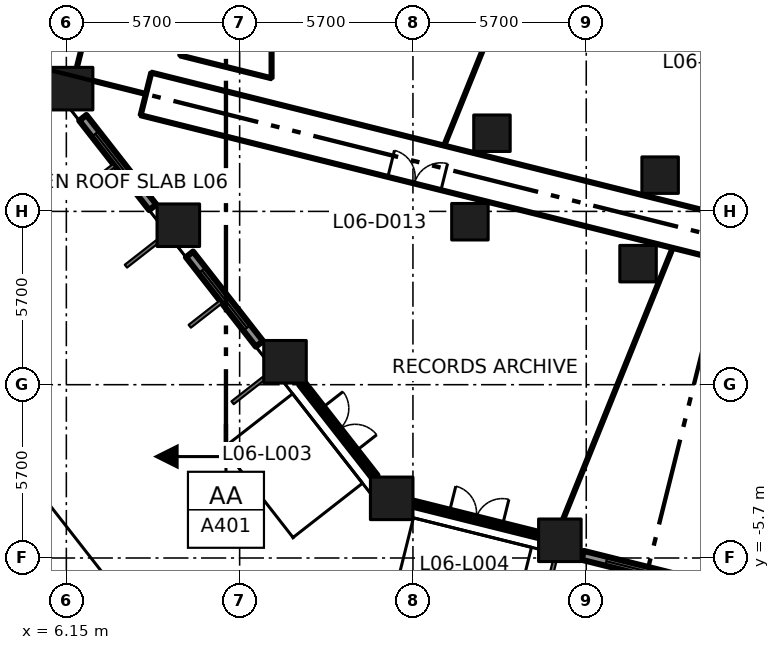
"""IFC4 building model, lengths in metres.
Left out: names, types, materials, properties, quantities, classifications, styles, units other than length and angle.
Written with IfcOpenShell. Run it as: python <this file> out.ifc"""

import sys

from ifc_helpers import new_model, si_unit, direction, frame, frame_2d, origin, origin_2d, place, context, subcontext, project, spatial, rectangle, extrude, element, fill, save


model = new_model("IFC4")
c1 = context("Model", 3, precision=1e-05, world=origin(), true_north=direction((0.0, 1.0)))
c2 = subcontext(c1, "Body", "Model", "MODEL_VIEW")
j1 = project(units=[si_unit("LENGTHUNIT", "METRE"), si_unit("PLANEANGLEUNIT", "RADIAN")], contexts=[c1])
p1 = place(None, origin())
s1 = spatial("IfcSite", under=j1, at=p1, CompositionType="ELEMENT")
p2 = place(p1, origin())
s2 = spatial("IfcBuilding", under=s1, at=p2, CompositionType="ELEMENT")
p3 = place(p2, frame((0.0, 0.0, 33.0)))
s3 = spatial("IfcBuildingStorey", under=s2, at=p3, CompositionType="ELEMENT", Elevation=33.0)
for number, where, z_axis, x_axis in (
    (1, (16.851, -3.738, 0.0), (0.0, 0.0, 1.0), (1.0, 0.0, 0.0)),
    (2, (13.342, 0.754, 0.0), (0.0, 0.0, 1.0), (1.0, 0.0, 0.0)),
    (3, (9.833, 5.245, 0.0), (0.0, 0.0, 1.0), (1.0, 0.0, 0.0)),
    (4, (6.323, 9.737, 0.0), (0.0, 0.0, 1.0), (1.0, 0.0, 0.0)),
    (5, (22.382, -5.117, 0.0), (0.0, 0.0, 1.0), (1.0, 0.0, 0.0)),
):
    element("IfcColumn", number, at=place(p3, frame(where, z_axis=z_axis, x_axis=x_axis)), inside=s3, PredefinedType="COLUMN", context=c2, shape_type="SweptSolid", body=[
        extrude(rectangle(XDim=1.4, YDim=1.4, at=origin_2d()), origin(), (0.0, 0.0, 1.0), 4.2),
    ])
for number, where, z_axis, x_axis in (
    (6, (19.424, 5.36, 0.0), (0.0, 0.0, 1.0), (1.0, 0.0, 0.0)),
    (7, (24.954, 3.981, 0.0), (0.0, 0.0, 1.0), (1.0, 0.0, 0.0)),
    (8, (20.149, 8.271, 0.0), (0.0, 0.0, 1.0), (1.0, 0.0, 0.0)),
    (9, (25.68, 6.892, 0.0), (0.0, 0.0, 1.0), (1.0, 0.0, 0.0)),
):
    element("IfcColumn", number, at=place(p3, frame(where, z_axis=z_axis, x_axis=x_axis)), inside=s3, PredefinedType="COLUMN", context=c2, shape_type="SweptSolid", body=[
        extrude(rectangle(XDim=1.2, YDim=1.2, at=origin_2d()), origin(), (0.0, 0.0, 1.0), 4.2),
    ])
p4 = place(p3, frame((6.692, 8.778, 0.0), z_axis=(0.0, 0.0, 1.0), x_axis=(0.615767067156, -0.787928244833, 0.0)))
e10 = element("IfcWall", 10, at=p4, inside=s3, PredefinedType="SOLIDWALL", context=c2, shape_type="SweptSolid", body=[
    extrude(rectangle(XDim=3.735, YDim=0.3, at=frame_2d((1.868, 0.0))), origin(), (0.0, 0.0, 1.0), 3.1),
])
p5 = place(p4, frame((0.668, 0.0, 0.8)))
e11 = element("IfcOpeningElement", 11, at=p5, cuts=e10, PredefinedType="OPENING", context=c2, shape_type="SweptSolid", body=[
    extrude(rectangle(XDim=2.4, YDim=2.1, at=frame_2d((1.2, 1.05))), frame((0.0, 0.16, 0.0), z_axis=(0.0, -1.0, 0.0), x_axis=(1.0, 0.0, 0.0)), (0.0, 0.0, 1.0), 0.32),
])
p6 = place(p3, frame((10.202, 4.286, 0.0), z_axis=(0.0, 0.0, 1.0), x_axis=(0.615636430057, -0.788030320474, 0.0)))
e12 = element("IfcWall", 12, at=p6, inside=s3, PredefinedType="SOLIDWALL", context=c2, shape_type="SweptSolid", body=[
    extrude(rectangle(XDim=3.734, YDim=0.3, at=frame_2d((1.867, 0.0))), origin(), (0.0, 0.0, 1.0), 3.1),
])
p7 = place(p6, frame((0.667, 0.0, 0.8)))
e13 = element("IfcOpeningElement", 13, at=p7, cuts=e12, PredefinedType="OPENING", context=c2, shape_type="SweptSolid", body=[
    extrude(rectangle(XDim=2.4, YDim=2.1, at=frame_2d((1.2, 1.05))), frame((0.0, 0.16, 0.0), z_axis=(0.0, -1.0, 0.0), x_axis=(1.0, 0.0, 0.0)), (0.0, 0.0, 1.0), 0.32),
])
p8 = place(p3, frame((13.889, 0.054, 0.0), z_axis=(0.0, 0.0, 1.0), x_axis=(0.615546225508, -0.788100783062, 0.0)))
e14 = element("IfcWall", 14, at=p8, inside=s3, PredefinedType="SOLIDWALL", context=c2, shape_type="SweptSolid", body=[
    extrude(rectangle(XDim=3.923, YDim=0.2, at=frame_2d((1.962, 0.0))), origin(), (0.0, 0.0, 1.0), 3.1),
])
p9 = place(p8, frame((1.061, 0.0, 0.0)))
e15 = element("IfcOpeningElement", 15, at=p9, cuts=e14, PredefinedType="OPENING", context=c2, shape_type="SweptSolid", body=[
    extrude(rectangle(XDim=1.8, YDim=2.9, at=frame_2d((0.9, 1.45))), frame((0.0, 0.11, 0.0), z_axis=(0.0, -1.0, 0.0), x_axis=(1.0, 0.0, 0.0)), (0.0, 0.0, 1.0), 0.22),
])
p10 = place(p3, frame((17.551, -3.912, 0.0), z_axis=(0.0, 0.0, 1.0), x_axis=(0.970304203713, -0.241887891919, 0.0)))
e16 = element("IfcWall", 16, at=p10, inside=s3, PredefinedType="SOLIDWALL", context=c2, shape_type="SweptSolid", body=[
    extrude(rectangle(XDim=4.257, YDim=0.2, at=frame_2d((2.129, 0.0))), origin(), (0.0, 0.0, 1.0), 3.1),
])
p11 = place(p10, frame((1.228, 0.0, 0.0)))
e17 = element("IfcOpeningElement", 17, at=p11, cuts=e16, PredefinedType="OPENING", context=c2, shape_type="SweptSolid", body=[
    extrude(rectangle(XDim=1.8, YDim=2.9, at=frame_2d((0.9, 1.45))), frame((0.0, 0.11, 0.0), z_axis=(0.0, -1.0, 0.0), x_axis=(1.0, 0.0, 0.0)), (0.0, 0.0, 1.0), 0.22),
])
p12 = place(p3, frame((23.133, -5.613, 0.0), z_axis=(0.0, 0.0, 1.0), x_axis=(0.970303772127, -0.241889623168, 0.0)))
e18 = element("IfcWall", 18, at=p12, inside=s3, PredefinedType="SOLIDWALL", context=c2, shape_type="SweptSolid", body=[
    extrude(rectangle(XDim=4.002, YDim=0.3, at=frame_2d((2.001, 0.0))), origin(), (0.0, 0.0, 1.0), 3.1),
])
p13 = place(p12, frame((0.801, 0.0, 0.8)))
e19 = element("IfcOpeningElement", 19, at=p13, cuts=e18, PredefinedType="OPENING", context=c2, shape_type="SweptSolid", body=[
    extrude(rectangle(XDim=2.4, YDim=2.1, at=frame_2d((1.2, 1.05))), frame((0.0, 0.16, 0.0), z_axis=(0.0, -1.0, 0.0), x_axis=(1.0, 0.0, 0.0)), (0.0, 0.0, 1.0), 0.32),
])
p14 = place(p3, frame((11.707, -11.659, 0.0), z_axis=(0.0, 0.0, 1.0), x_axis=(-0.61565155533, 0.788018503856, 0.0)))
e20 = element("IfcWall", 20, at=p14, inside=s3, PredefinedType="PARAPET", context=c2, shape_type="SweptSolid", body=[
    extrude(rectangle(XDim=32.79, YDim=0.25, at=frame_2d((16.395, 0.0))), origin(), (0.0, 0.0, 1.0), 1.2),
])
p15 = place(p3, frame((7.416, -3.568, 0.0), z_axis=(0.0, 0.0, 1.0), x_axis=(-0.615540980843, 0.78810487938, 0.0)))
e21 = element("IfcWall", 21, at=p15, inside=s3, PredefinedType="SOLIDWALL", context=c2, shape_type="SweptSolid", body=[
    extrude(rectangle(XDim=4.0, YDim=1.2, at=frame_2d((2.0, 0.0))), origin(), (0.0, 0.0, 1.0), 0.6),
])
p16 = place(p3, frame((10.095, -1.507, 0.0), z_axis=(0.0, 0.0, 1.0), x_axis=(0.615699645246, -0.787980930507, 0.0)))
e22 = element("IfcWall", 22, at=p16, inside=s3, PredefinedType="SOLIDWALL", context=c2, shape_type="SweptSolid", body=[
    extrude(rectangle(XDim=6.135, YDim=1.2, at=frame_2d((3.067, 0.0))), origin(), (0.0, 0.0, 1.0), 0.6),
])
p17 = place(p3, frame((13.067, 0.054, 0.0), z_axis=(0.0, 0.0, 1.0), x_axis=(-0.78787093138, -0.615840397739, 0.0)))
e23 = element("IfcWall", 23, at=p17, inside=s3, PredefinedType="SOLIDWALL", context=c2, shape_type="SweptSolid", body=[
    extrude(rectangle(XDim=2.702, YDim=1.2, at=frame_2d((1.351, 0.0))), origin(), (0.0, 0.0, 1.0), 0.6),
])
p18 = place(p3, frame((16.151, -3.8, 0.0), z_axis=(0.0, 0.0, 1.0), x_axis=(-0.788040467637, -0.615623441209, 0.0)))
e24 = element("IfcWall", 24, at=p18, inside=s3, PredefinedType="SOLIDWALL", context=c2, shape_type="SweptSolid", body=[
    extrude(rectangle(XDim=2.76, YDim=1.2, at=frame_2d((1.38, 0.0))), origin(), (0.0, 0.0, 1.0), 0.6),
])
p19 = place(p3, frame((16.933, -4.438, 0.0), z_axis=(0.0, 0.0, 1.0), x_axis=(-0.242044447499, -0.970265162435, 0.0)))
e25 = element("IfcWall", 25, at=p19, inside=s3, PredefinedType="SOLIDWALL", context=c2, shape_type="SweptSolid", body=[
    extrude(rectangle(XDim=2.69, YDim=1.2, at=frame_2d((1.345, 0.0))), origin(), (0.0, 0.0, 1.0), 0.6),
])
p20 = place(p3, frame((21.951, -5.817, 0.0), z_axis=(0.0, 0.0, 1.0), x_axis=(-0.241931183719, -0.970293410441, 0.0)))
e26 = element("IfcWall", 26, at=p20, inside=s3, PredefinedType="SOLIDWALL", context=c2, shape_type="SweptSolid", body=[
    extrude(rectangle(XDim=2.566, YDim=1.2, at=frame_2d((1.283, 0.0))), origin(), (0.0, 0.0, 1.0), 0.6),
])
p21 = place(p3, frame((8.594, 8.862, 0.0), z_axis=(0.0, 0.0, 1.0), x_axis=(0.970293746648, -0.241929835316, 0.0)))
e27 = element("IfcWall", 27, at=p21, inside=s3, PredefinedType="PARTITIONING", context=c2, shape_type="SweptSolid", body=[
    extrude(rectangle(XDim=68.375, YDim=0.1, at=frame_2d((34.188, 0.0))), origin(), (0.0, 0.0, 1.0), 3.9),
])
p22 = place(p21, frame((37.708, 0.0, 0.0)))
e28 = element("IfcOpeningElement", 28, at=p22, cuts=e27, PredefinedType="OPENING", context=c2, shape_type="SweptSolid", body=[
    extrude(rectangle(XDim=1.0, YDim=2.1, at=frame_2d((0.5, 1.05))), frame((0.0, 0.06, 0.0), z_axis=(0.0, -1.0, 0.0), x_axis=(1.0, 0.0, 0.0)), (0.0, 0.0, 1.0), 0.12),
])
p23 = place(p21, frame((42.708, 0.0, 0.0)))
e29 = element("IfcOpeningElement", 29, at=p23, cuts=e27, PredefinedType="OPENING", context=c2, shape_type="SweptSolid", body=[
    extrude(rectangle(XDim=1.8, YDim=2.1, at=frame_2d((0.9, 1.05))), frame((0.0, 0.06, 0.0), z_axis=(0.0, -1.0, 0.0), x_axis=(1.0, 0.0, 0.0)), (0.0, 0.0, 1.0), 0.12),
])
p24 = place(p21, frame((58.508, 0.0, 0.0)))
e30 = element("IfcOpeningElement", 30, at=p24, cuts=e27, PredefinedType="OPENING", context=c2, shape_type="SweptSolid", body=[
    extrude(rectangle(XDim=1.8, YDim=2.1, at=frame_2d((0.9, 1.05))), frame((0.0, 0.06, 0.0), z_axis=(0.0, -1.0, 0.0), x_axis=(1.0, 0.0, 0.0)), (0.0, 0.0, 1.0), 0.12),
])
p25 = place(p21, frame((25.408, 0.0, 0.0)))
e31 = element("IfcOpeningElement", 31, at=p25, cuts=e27, PredefinedType="OPENING", context=c2, shape_type="SweptSolid", body=[
    extrude(rectangle(XDim=1.8, YDim=2.1, at=frame_2d((0.9, 1.05))), frame((0.0, 0.06, 0.0), z_axis=(0.0, -1.0, 0.0), x_axis=(1.0, 0.0, 0.0)), (0.0, 0.0, 1.0), 0.12),
])
p26 = place(p21, frame((31.308, 0.0, 0.0)))
e32 = element("IfcOpeningElement", 32, at=p26, cuts=e27, PredefinedType="OPENING", context=c2, shape_type="SweptSolid", body=[
    extrude(rectangle(XDim=1.0, YDim=2.1, at=frame_2d((0.5, 1.05))), frame((0.0, 0.06, 0.0), z_axis=(0.0, -1.0, 0.0), x_axis=(1.0, 0.0, 0.0)), (0.0, 0.0, 1.0), 0.12),
])
p27 = place(p21, frame((8.38, 0.0, 0.0)))
e33 = element("IfcOpeningElement", 33, at=p27, cuts=e27, PredefinedType="OPENING", context=c2, shape_type="SweptSolid", body=[
    extrude(rectangle(XDim=1.8, YDim=2.1, at=frame_2d((0.9, 1.05))), frame((0.0, 0.06, 0.0), z_axis=(0.0, -1.0, 0.0), x_axis=(1.0, 0.0, 0.0)), (0.0, 0.0, 1.0), 0.12),
])
p28 = place(p3, frame((8.944, 10.264, 0.0), z_axis=(0.0, 0.0, 1.0), x_axis=(0.970300504447, -0.241902730595, 0.0)))
e34 = element("IfcWall", 34, at=p28, inside=s3, PredefinedType="PARTITIONING", context=c2, shape_type="SweptSolid", body=[
    extrude(rectangle(XDim=19.879, YDim=0.1, at=frame_2d((9.939, 0.0))), origin(), (0.0, 0.0, 1.0), 3.9),
])
p29 = place(p3, frame((8.944, 10.264, 0.0), z_axis=(0.0, 0.0, 1.0), x_axis=(-0.242297077633, -0.970202105837, 0.0)))
e35 = element("IfcWall", 35, at=p29, inside=s3, PredefinedType="PARTITIONING", context=c2, shape_type="SweptSolid", body=[
    extrude(rectangle(XDim=1.445, YDim=0.1, at=frame_2d((0.722, 0.0))), origin(), (0.0, 0.0, 1.0), 3.9),
])
p30 = place(p3, frame((9.9, 10.826, 0.0), z_axis=(0.0, 0.0, 1.0), x_axis=(0.970290953223, -0.241941038466, 0.0)))
e36 = element("IfcWall", 36, at=p30, inside=s3, PredefinedType="PARTITIONING", context=c2, shape_type="SweptSolid", body=[
    extrude(rectangle(XDim=3.092, YDim=0.1, at=frame_2d((1.546, 0.0))), origin(), (0.0, 0.0, 1.0), 3.9),
])
p31 = place(p3, frame((9.9, 12.2, 0.0), z_axis=(0.0, 0.0, 1.0), x_axis=(0.0, -1.0, 0.0)))
e37 = element("IfcWall", 37, at=p31, inside=s3, PredefinedType="PARTITIONING", context=c2, shape_type="SweptSolid", body=[
    extrude(rectangle(XDim=1.374, YDim=0.1, at=frame_2d((0.687, 0.0))), origin(), (0.0, 0.0, 1.0), 3.9),
])
p32 = place(p3, frame((12.9, 10.078, 0.0), z_axis=(0.0, 0.0, 1.0), x_axis=(0.0, 1.0, 0.0)))
e38 = element("IfcWall", 38, at=p32, inside=s3, PredefinedType="PARTITIONING", context=c2, shape_type="SweptSolid", body=[
    extrude(rectangle(XDim=4.022, YDim=0.1, at=frame_2d((2.011, 0.0))), origin(), (0.0, 0.0, 1.0), 3.9),
])
p33 = place(p3, frame((6.922, 12.138, 0.0), z_axis=(0.0, 0.0, 1.0), x_axis=(-0.242437328426, -0.970167069007, 0.0)))
e39 = element("IfcWall", 39, at=p33, inside=s3, PredefinedType="PARTITIONING", context=c2, shape_type="SweptSolid", body=[
    extrude(rectangle(XDim=1.753, YDim=0.1, at=frame_2d((0.876, 0.0))), origin(), (0.0, 0.0, 1.0), 3.9),
])
p34 = place(p3, frame((8.72, 9.574, 0.0), z_axis=(0.0, 0.0, 1.0), x_axis=(-0.97016712555, 0.242437102155, 0.0)))
e40 = element("IfcWall", 40, at=p34, inside=s3, PredefinedType="PARTITIONING", context=c2, shape_type="SweptSolid", body=[
    extrude(rectangle(XDim=1.749, YDim=0.1, at=frame_2d((0.875, 0.0))), origin(), (0.0, 0.0, 1.0), 3.9),
])
p35 = place(p3, frame((18.599, 7.915, 0.0), z_axis=(0.0, 0.0, 1.0), x_axis=(0.374461839275, 0.927242325892, 0.0)))
e41 = element("IfcWall", 41, at=p35, inside=s3, PredefinedType="PARTITIONING", context=c2, shape_type="SweptSolid", body=[
    extrude(rectangle(XDim=6.67, YDim=0.1, at=frame_2d((3.335, 0.0))), origin(), (0.0, 0.0, 1.0), 3.9),
])
p36 = place(p3, frame((22.493, -4.417, 0.0), z_axis=(0.0, 0.0, 1.0), x_axis=(0.374480366096, 0.92723484372, 0.0)))
e42 = element("IfcWall", 42, at=p36, inside=s3, PredefinedType="PARTITIONING", context=c2, shape_type="SweptSolid", body=[
    extrude(rectangle(XDim=9.558, YDim=0.1, at=frame_2d((4.779, 0.0))), origin(), (0.0, 0.0, 1.0), 3.9),
])
p37 = place(p5, origin())
e43 = element("IfcWindow", 43, at=p37, inside=s3, PartitioningType="DOUBLE_PANEL_VERTICAL", PredefinedType="WINDOW", context=c2, shape_type="SweptSolid", body=[
    extrude(rectangle(XDim=2.4, YDim=2.1, at=frame_2d((1.2, 1.05))), frame((0.0, 0.03, 0.0), z_axis=(0.0, -1.0, 0.0), x_axis=(1.0, 0.0, 0.0)), (0.0, 0.0, 1.0), 0.06),
])
fill(e11, e43)
p38 = place(p7, origin())
e44 = element("IfcWindow", 44, at=p38, inside=s3, PartitioningType="DOUBLE_PANEL_VERTICAL", PredefinedType="WINDOW", context=c2, shape_type="SweptSolid", body=[
    extrude(rectangle(XDim=2.4, YDim=2.1, at=frame_2d((1.2, 1.05))), frame((0.0, 0.03, 0.0), z_axis=(0.0, -1.0, 0.0), x_axis=(1.0, 0.0, 0.0)), (0.0, 0.0, 1.0), 0.06),
])
fill(e13, e44)
p39 = place(p9, origin())
e45 = element("IfcDoor", 45, at=p39, inside=s3, OperationType="DOUBLE_DOOR_SINGLE_SWING", PredefinedType="DOOR", context=c2, shape_type="SweptSolid", body=[
    extrude(rectangle(XDim=1.8, YDim=2.9, at=frame_2d((0.9, 1.45))), frame((0.0, 0.025, 0.0), z_axis=(0.0, -1.0, 0.0), x_axis=(1.0, 0.0, 0.0)), (0.0, 0.0, 1.0), 0.05),
])
fill(e15, e45)
p40 = place(p11, origin())
e46 = element("IfcDoor", 46, at=p40, inside=s3, OperationType="DOUBLE_DOOR_SINGLE_SWING", PredefinedType="DOOR", context=c2, shape_type="SweptSolid", body=[
    extrude(rectangle(XDim=1.8, YDim=2.9, at=frame_2d((0.9, 1.45))), frame((0.0, 0.025, 0.0), z_axis=(0.0, -1.0, 0.0), x_axis=(1.0, 0.0, 0.0)), (0.0, 0.0, 1.0), 0.05),
])
fill(e17, e46)
p41 = place(p13, origin())
e47 = element("IfcWindow", 47, at=p41, inside=s3, PartitioningType="DOUBLE_PANEL_VERTICAL", PredefinedType="WINDOW", context=c2, shape_type="SweptSolid", body=[
    extrude(rectangle(XDim=2.4, YDim=2.1, at=frame_2d((1.2, 1.05))), frame((0.0, 0.03, 0.0), z_axis=(0.0, -1.0, 0.0), x_axis=(1.0, 0.0, 0.0)), (0.0, 0.0, 1.0), 0.06),
])
fill(e19, e47)
p42 = place(p27, origin())
e48 = element("IfcDoor", 48, at=p42, inside=s3, OperationType="DOUBLE_DOOR_SINGLE_SWING", PredefinedType="DOOR", context=c2, shape_type="SweptSolid", body=[
    extrude(rectangle(XDim=1.8, YDim=2.1, at=frame_2d((0.9, 1.05))), frame((0.0, 0.025, 0.0), z_axis=(0.0, -1.0, 0.0), x_axis=(1.0, 0.0, 0.0)), (0.0, 0.0, 1.0), 0.05),
])
fill(e33, e48)
save(model, sys.argv[1])
